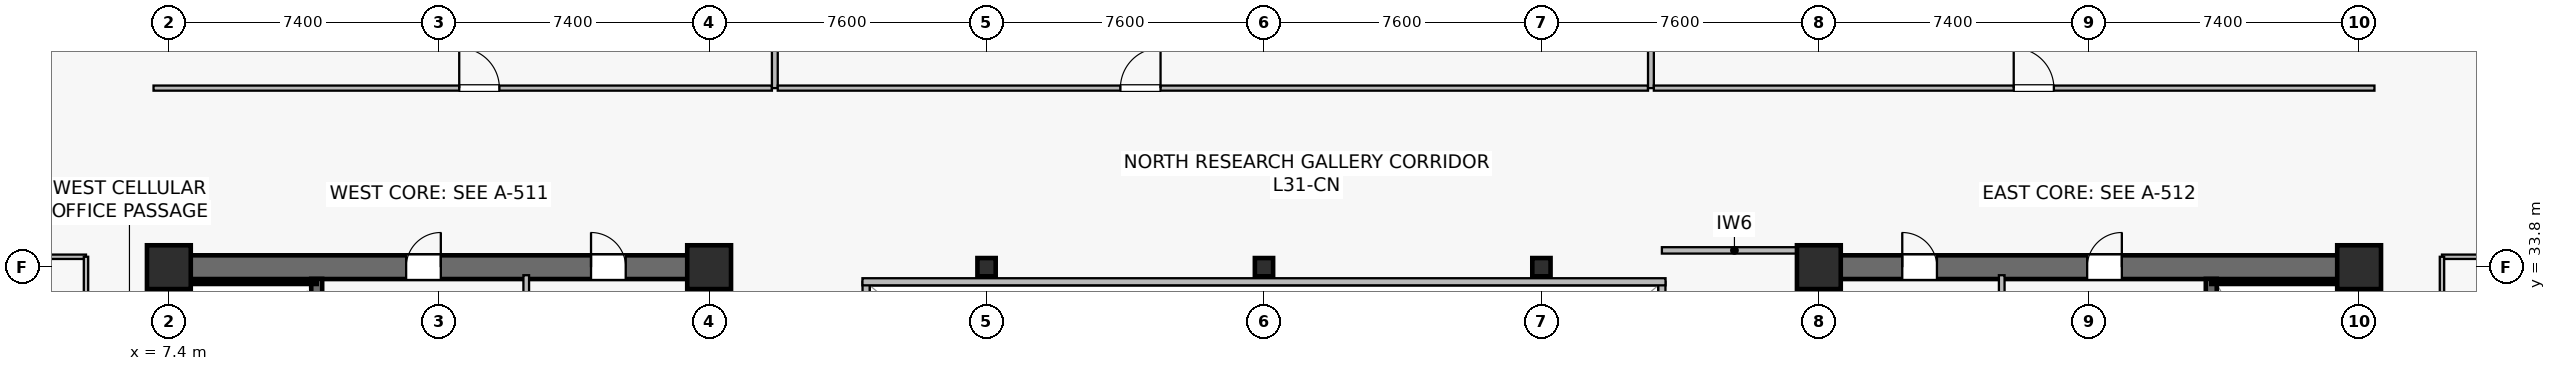
"""IFC4 building model, lengths in metres.
Left out: names, types, materials, properties, quantities, classifications, styles, units other than length and angle.
Written with IfcOpenShell. Run it as: python <this file> out.ifc"""

import sys

from ifc_helpers import new_model, si_unit, direction, frame, frame_2d, origin, origin_2d, place, context, subcontext, project, spatial, rectangle, hollow_rectangle, extrude, source, transform, mapped, element, fill, save


model = new_model("IFC4")
c1 = context("Model", 3, precision=1e-05, world=origin(), true_north=direction((0.0, 1.0)))
c2 = subcontext(c1, "Body", "Model", "MODEL_VIEW")
j1 = project(units=[si_unit("LENGTHUNIT", "METRE"), si_unit("PLANEANGLEUNIT", "RADIAN")], contexts=[c1])
p1 = place(None, origin())
s1 = spatial("IfcSite", under=j1, at=p1, CompositionType="ELEMENT")
p2 = place(p1, origin())
s2 = spatial("IfcBuilding", under=s1, at=p2, CompositionType="ELEMENT")
p3 = place(p2, frame((0.0, 0.0, 129.7)))
s3 = spatial("IfcBuildingStorey", under=s2, at=p3, CompositionType="ELEMENT", Elevation=129.7)
p4 = place(p3, frame((7.075, 33.8, 0.0), z_axis=(0.0, 0.0, 1.0), x_axis=(1.0, 0.0, 0.0)))
e1 = element("IfcWall", 1, at=p4, inside=s3, PredefinedType="SHEAR", context=c2, shape_type="SweptSolid", body=[
    extrude(rectangle(XDim=15.45, YDim=0.65, at=frame_2d((7.725, 0.0))), origin(), (0.0, 0.0, 1.0), 3.79),
])
p5 = place(p4, frame((6.825, 0.0, 0.0)))
e2 = element("IfcOpeningElement", 2, at=p5, cuts=e1, PredefinedType="OPENING", context=c2, shape_type="SweptSolid", body=[
    extrude(rectangle(XDim=0.95, YDim=2.15, at=frame_2d((0.475, 1.075))), frame((0.0, 0.335, 0.0), z_axis=(0.0, -1.0, 0.0), x_axis=(1.0, 0.0, 0.0)), (0.0, 0.0, 1.0), 0.67),
])
p6 = place(p4, frame((11.89, 0.0, 0.0)))
e3 = element("IfcOpeningElement", 3, at=p6, cuts=e1, PredefinedType="OPENING", context=c2, shape_type="SweptSolid", body=[
    extrude(rectangle(XDim=0.95, YDim=2.15, at=frame_2d((0.475, 1.075))), frame((0.0, 0.335, 0.0), z_axis=(0.0, -1.0, 0.0), x_axis=(1.0, 0.0, 0.0)), (0.0, 0.0, 1.0), 0.67),
])
p7 = place(p3, frame((7.4, 15.125, 0.0), z_axis=(0.0, 0.0, 1.0), x_axis=(0.0, 1.0, 0.0)))
e4 = element("IfcWall", 4, at=p7, inside=s3, PredefinedType="SHEAR", context=c2, shape_type="SweptSolid", body=[
    extrude(rectangle(XDim=18.35, YDim=0.65, at=frame_2d((9.175, 0.0))), origin(), (0.0, 0.0, 1.0), 3.79),
])
p8 = place(p3, frame((22.2, 15.125, 0.0), z_axis=(0.0, 0.0, 1.0), x_axis=(0.0, 1.0, 0.0)))
e5 = element("IfcWall", 5, at=p8, inside=s3, PredefinedType="SHEAR", context=c2, shape_type="SweptSolid", body=[
    extrude(rectangle(XDim=18.35, YDim=0.65, at=frame_2d((9.175, 0.0))), origin(), (0.0, 0.0, 1.0), 3.79),
])
p9 = place(p8, frame((3.425, 0.0, 0.0)))
e6 = element("IfcOpeningElement", 6, at=p9, cuts=e5, PredefinedType="OPENING", context=c2, shape_type="SweptSolid", body=[
    extrude(rectangle(XDim=1.42, YDim=2.2, at=frame_2d((0.71, 1.1))), frame((0.0, 0.335, 0.0), z_axis=(0.0, -1.0, 0.0), x_axis=(1.0, 0.0, 0.0)), (0.0, 0.0, 1.0), 0.67),
])
p10 = place(p3, frame((11.45, 24.85, 0.0), z_axis=(0.0, 0.0, 1.0), x_axis=(0.0, 1.0, 0.0)))
e7 = element("IfcWall", 7, at=p10, inside=s3, PredefinedType="SHEAR", context=c2, shape_type="SweptSolid", body=[
    extrude(rectangle(XDim=8.63, YDim=0.3, at=frame_2d((4.315, 0.0))), origin(), (0.0, 0.0, 1.0), 3.79),
])
p11 = place(p10, frame((0.42, 0.0, 0.0)))
e8 = element("IfcOpeningElement", 8, at=p11, cuts=e7, PredefinedType="OPENING", context=c2, shape_type="SweptSolid", body=[
    extrude(rectangle(XDim=1.1, YDim=2.15, at=frame_2d((0.55, 1.075))), frame((0.0, 0.16, 0.0), z_axis=(0.0, -1.0, 0.0), x_axis=(1.0, 0.0, 0.0)), (0.0, 0.0, 1.0), 0.32),
])
p12 = place(p3, frame((7.73, 33.4, 0.0), z_axis=(0.0, 0.0, 1.0), x_axis=(1.0, 0.0, 0.0)))
e9 = element("IfcWall", 9, at=p12, inside=s3, PredefinedType="SOLIDWALL", context=c2, shape_type="SweptSolid", body=[
    extrude(rectangle(XDim=3.72, YDim=0.12, at=frame_2d((1.86, 0.0))), origin(), (0.0, 0.0, 1.0), 3.79),
])
p13 = place(p3, frame((7.73, 25.0, 0.0), z_axis=(0.0, 0.0, 1.0), x_axis=(0.0, 1.0, 0.0)))
e10 = element("IfcWall", 10, at=p13, inside=s3, PredefinedType="SOLIDWALL", context=c2, shape_type="SweptSolid", body=[
    extrude(rectangle(XDim=8.32, YDim=0.12, at=frame_2d((4.16, 0.0))), origin(), (0.0, 0.0, 1.0), 3.79),
])
p14 = place(p3, frame((52.275, 33.8, 0.0), z_axis=(0.0, 0.0, 1.0), x_axis=(1.0, 0.0, 0.0)))
e11 = element("IfcWall", 11, at=p14, inside=s3, PredefinedType="SHEAR", context=c2, shape_type="SweptSolid", body=[
    extrude(rectangle(XDim=15.45, YDim=0.65, at=frame_2d((7.725, 0.0))), origin(), (0.0, 0.0, 1.0), 3.79),
])
p15 = place(p14, frame((7.675, 0.0, 0.0)))
e12 = element("IfcOpeningElement", 12, at=p15, cuts=e11, PredefinedType="OPENING", context=c2, shape_type="SweptSolid", body=[
    extrude(rectangle(XDim=0.95, YDim=2.15, at=frame_2d((0.475, 1.075))), frame((0.0, 0.335, 0.0), z_axis=(0.0, -1.0, 0.0), x_axis=(1.0, 0.0, 0.0)), (0.0, 0.0, 1.0), 0.67),
])
p16 = place(p14, frame((2.61, 0.0, 0.0)))
e13 = element("IfcOpeningElement", 13, at=p16, cuts=e11, PredefinedType="OPENING", context=c2, shape_type="SweptSolid", body=[
    extrude(rectangle(XDim=0.95, YDim=2.15, at=frame_2d((0.475, 1.075))), frame((0.0, 0.335, 0.0), z_axis=(0.0, -1.0, 0.0), x_axis=(1.0, 0.0, 0.0)), (0.0, 0.0, 1.0), 0.67),
])
p17 = place(p3, frame((52.6, 15.125, 0.0), z_axis=(0.0, 0.0, 1.0), x_axis=(0.0, 1.0, 0.0)))
e14 = element("IfcWall", 14, at=p17, inside=s3, PredefinedType="SHEAR", context=c2, shape_type="SweptSolid", body=[
    extrude(rectangle(XDim=18.35, YDim=0.65, at=frame_2d((9.175, 0.0))), origin(), (0.0, 0.0, 1.0), 3.79),
])
p18 = place(p17, frame((3.425, 0.0, 0.0)))
e15 = element("IfcOpeningElement", 15, at=p18, cuts=e14, PredefinedType="OPENING", context=c2, shape_type="SweptSolid", body=[
    extrude(rectangle(XDim=1.42, YDim=2.2, at=frame_2d((0.71, 1.1))), frame((0.0, 0.335, 0.0), z_axis=(0.0, -1.0, 0.0), x_axis=(1.0, 0.0, 0.0)), (0.0, 0.0, 1.0), 0.67),
])
p19 = place(p3, frame((67.4, 15.125, 0.0), z_axis=(0.0, 0.0, 1.0), x_axis=(0.0, 1.0, 0.0)))
e16 = element("IfcWall", 16, at=p19, inside=s3, PredefinedType="SHEAR", context=c2, shape_type="SweptSolid", body=[
    extrude(rectangle(XDim=18.35, YDim=0.65, at=frame_2d((9.175, 0.0))), origin(), (0.0, 0.0, 1.0), 3.79),
])
p20 = place(p3, frame((63.35, 24.85, 0.0), z_axis=(0.0, 0.0, 1.0), x_axis=(0.0, 1.0, 0.0)))
e17 = element("IfcWall", 17, at=p20, inside=s3, PredefinedType="SHEAR", context=c2, shape_type="SweptSolid", body=[
    extrude(rectangle(XDim=8.63, YDim=0.3, at=frame_2d((4.315, 0.0))), origin(), (0.0, 0.0, 1.0), 3.79),
])
p21 = place(p20, frame((0.42, 0.0, 0.0)))
e18 = element("IfcOpeningElement", 18, at=p21, cuts=e17, PredefinedType="OPENING", context=c2, shape_type="SweptSolid", body=[
    extrude(rectangle(XDim=1.1, YDim=2.15, at=frame_2d((0.55, 1.075))), frame((0.0, 0.16, 0.0), z_axis=(0.0, -1.0, 0.0), x_axis=(1.0, 0.0, 0.0)), (0.0, 0.0, 1.0), 0.32),
])
p22 = place(p3, frame((63.35, 33.4, 0.0), z_axis=(0.0, 0.0, 1.0), x_axis=(1.0, 0.0, 0.0)))
e19 = element("IfcWall", 19, at=p22, inside=s3, PredefinedType="SOLIDWALL", context=c2, shape_type="SweptSolid", body=[
    extrude(rectangle(XDim=3.72, YDim=0.12, at=frame_2d((1.86, 0.0))), origin(), (0.0, 0.0, 1.0), 3.79),
])
p23 = place(p3, frame((67.07, 25.0, 0.0), z_axis=(0.0, 0.0, 1.0), x_axis=(0.0, 1.0, 0.0)))
e20 = element("IfcWall", 20, at=p23, inside=s3, PredefinedType="SOLIDWALL", context=c2, shape_type="SweptSolid", body=[
    extrude(rectangle(XDim=8.32, YDim=0.12, at=frame_2d((4.16, 0.0))), origin(), (0.0, 0.0, 1.0), 3.79),
])
m1 = source(origin(), c2, "Body", "SweptSolid", [
    extrude(rectangle(XDim=1.2, YDim=1.2, at=origin_2d()), origin(), (0.0, 0.0, 1.0), 4.1),
])
for number, where, z_axis, x_axis in (
    (21, (7.4, 33.8, 0.0), (0.0, 0.0, 1.0), (1.0, 0.0, 0.0)),
    (22, (22.2, 33.8, 0.0), (0.0, 0.0, 1.0), (1.0, 0.0, 0.0)),
    (23, (52.6, 33.8, 0.0), (0.0, 0.0, 1.0), (1.0, 0.0, 0.0)),
    (24, (67.4, 33.8, 0.0), (0.0, 0.0, 1.0), (1.0, 0.0, 0.0)),
):
    element("IfcColumn", number, at=place(p3, frame(where, z_axis=z_axis, x_axis=x_axis)), inside=s3, PredefinedType="COLUMN", context=c2, shape_type="MappedRepresentation", body=[
        mapped(m1, transform((0.0, 0.0, 0.0), scale=1.0)),
    ])
m2 = source(origin(), c2, "Body", "SweptSolid", [
    extrude(hollow_rectangle(XDim=0.5, YDim=0.5, WallThickness=0.022, at=origin_2d()), origin(), (0.0, 0.0, 1.0), 4.1),
])
for number, where, z_axis, x_axis in (
    (25, (29.8, 33.8, 0.0), (0.0, 0.0, 1.0), (1.0, 0.0, 0.0)),
    (26, (37.4, 33.8, 0.0), (0.0, 0.0, 1.0), (1.0, 0.0, 0.0)),
    (27, (45.0, 33.8, 0.0), (0.0, 0.0, 1.0), (1.0, 0.0, 0.0)),
):
    element("IfcColumn", number, at=place(p3, frame(where, z_axis=z_axis, x_axis=x_axis)), inside=s3, PredefinedType="COLUMN", context=c2, shape_type="MappedRepresentation", body=[
        mapped(m2, transform((0.0, 0.0, 0.0), scale=1.0)),
    ])
for number, where, z_axis, x_axis in (
    (28, (17.19, 29.65, 0.0), (0.0, 0.0, 1.0), (0.0, 1.0, 0.0)),
    (29, (57.61, 29.65, 0.0), (0.0, 0.0, 1.0), (0.0, 1.0, 0.0)),
):
    element("IfcWall", number, at=place(p3, frame(where, z_axis=z_axis, x_axis=x_axis)), inside=s3, PredefinedType="PLUMBINGWALL", context=c2, shape_type="SweptSolid", body=[
        extrude(rectangle(XDim=3.93, YDim=0.155, at=frame_2d((1.965, 0.0))), origin(), (0.0, 0.0, 1.0), 3.79),
    ])
p24 = place(p3, frame((48.3, 34.26, 0.0), z_axis=(0.0, 0.0, 1.0), x_axis=(1.0, 0.0, 0.0)))
e30 = element("IfcWall", 30, at=p24, inside=s3, PredefinedType="PARTITIONING", context=c2, shape_type="SweptSolid", body=[
    extrude(rectangle(XDim=3.975, YDim=0.175, at=frame_2d((1.987, 0.0))), origin(), (0.0, 0.0, 1.0), 3.475),
])
p25 = place(p3, frame((26.5, 15.2, 0.0), z_axis=(0.0, 0.0, 1.0), x_axis=(0.0, 1.0, 0.0)))
e31 = element("IfcWall", 31, at=p25, inside=s3, PredefinedType="SOLIDWALL", context=c2, shape_type="SweptSolid", body=[
    extrude(rectangle(XDim=18.2, YDim=0.195, at=frame_2d((9.1, 0.0))), origin(), (0.0, 0.0, 1.0), 3.79),
])
p26 = place(p25, frame((1.8, 0.0, 0.9)))
e32 = element("IfcOpeningElement", 32, at=p26, cuts=e31, PredefinedType="OPENING", context=c2, shape_type="SweptSolid", body=[
    extrude(rectangle(XDim=1.2, YDim=1.35, at=frame_2d((0.6, 0.675))), frame((0.0, 0.107, 0.0), z_axis=(0.0, -1.0, 0.0), x_axis=(1.0, 0.0, 0.0)), (0.0, 0.0, 1.0), 0.215),
])
p27 = place(p25, frame((13.2, 0.0, 0.9)))
e33 = element("IfcOpeningElement", 33, at=p27, cuts=e31, PredefinedType="OPENING", context=c2, shape_type="SweptSolid", body=[
    extrude(rectangle(XDim=1.2, YDim=1.35, at=frame_2d((0.6, 0.675))), frame((0.0, 0.107, 0.0), z_axis=(0.0, -1.0, 0.0), x_axis=(1.0, 0.0, 0.0)), (0.0, 0.0, 1.0), 0.215),
])
p28 = place(p3, frame((48.3, 15.2, 0.0), z_axis=(0.0, 0.0, 1.0), x_axis=(0.0, 1.0, 0.0)))
e34 = element("IfcWall", 34, at=p28, inside=s3, PredefinedType="SOLIDWALL", context=c2, shape_type="SweptSolid", body=[
    extrude(rectangle(XDim=18.2, YDim=0.195, at=frame_2d((9.1, 0.0))), origin(), (0.0, 0.0, 1.0), 3.79),
])
p29 = place(p28, frame((1.8, 0.0, 0.9)))
e35 = element("IfcOpeningElement", 35, at=p29, cuts=e34, PredefinedType="OPENING", context=c2, shape_type="SweptSolid", body=[
    extrude(rectangle(XDim=1.2, YDim=1.35, at=frame_2d((0.6, 0.675))), frame((0.0, 0.107, 0.0), z_axis=(0.0, -1.0, 0.0), x_axis=(1.0, 0.0, 0.0)), (0.0, 0.0, 1.0), 0.215),
])
p30 = place(p28, frame((13.2, 0.0, 0.9)))
e36 = element("IfcOpeningElement", 36, at=p30, cuts=e34, PredefinedType="OPENING", context=c2, shape_type="SweptSolid", body=[
    extrude(rectangle(XDim=1.2, YDim=1.35, at=frame_2d((0.6, 0.675))), frame((0.0, 0.107, 0.0), z_axis=(0.0, -1.0, 0.0), x_axis=(1.0, 0.0, 0.0)), (0.0, 0.0, 1.0), 0.215),
])
p31 = place(p3, frame((26.4, 33.4, 0.0), z_axis=(0.0, 0.0, 1.0), x_axis=(1.0, 0.0, 0.0)))
e37 = element("IfcWall", 37, at=p31, inside=s3, PredefinedType="SOLIDWALL", context=c2, shape_type="SweptSolid", body=[
    extrude(rectangle(XDim=22.0, YDim=0.195, at=frame_2d((11.0, 0.0))), origin(), (0.0, 0.0, 1.0), 3.79),
])
p32 = place(p3, frame((6.98, 38.705, 0.0), z_axis=(0.0, 0.0, 1.0), x_axis=(1.0, 0.0, 0.0)))
e38 = element("IfcWall", 38, at=p32, inside=s3, PredefinedType="PARTITIONING", context=c2, shape_type="SweptSolid", body=[
    extrude(rectangle(XDim=16.94, YDim=0.14, at=frame_2d((8.47, 0.0))), origin(), (0.0, 0.0, 1.0), 3.125),
])
p33 = place(p32, frame((8.374, 0.0, 0.0)))
e39 = element("IfcOpeningElement", 39, at=p33, cuts=e38, PredefinedType="OPENING", context=c2, shape_type="SweptSolid", body=[
    extrude(rectangle(XDim=1.1, YDim=2.18, at=frame_2d((0.55, 1.09))), frame((0.0, 0.08, 0.0), z_axis=(0.0, -1.0, 0.0), x_axis=(1.0, 0.0, 0.0)), (0.0, 0.0, 1.0), 0.16),
])
p34 = place(p3, frame((24.0, 38.705, 0.0), z_axis=(0.0, 0.0, 1.0), x_axis=(0.0, 1.0, 0.0)))
e40 = element("IfcWall", 40, at=p34, inside=s3, PredefinedType="PARTITIONING", context=c2, shape_type="SweptSolid", body=[
    extrude(rectangle(XDim=8.485, YDim=0.16, at=frame_2d((4.242, 0.0))), origin(), (0.0, 0.0, 1.0), 3.075),
])
p35 = place(p3, frame((24.08, 38.705, 0.0), z_axis=(0.0, 0.0, 1.0), x_axis=(1.0, 0.0, 0.0)))
e41 = element("IfcWall", 41, at=p35, inside=s3, PredefinedType="PARTITIONING", context=c2, shape_type="SweptSolid", body=[
    extrude(rectangle(XDim=23.84, YDim=0.14, at=frame_2d((11.92, 0.0))), origin(), (0.0, 0.0, 1.0), 3.125),
])
p36 = place(p35, frame((9.386, 0.0, 0.0)))
e42 = element("IfcOpeningElement", 42, at=p36, cuts=e41, PredefinedType="OPENING", context=c2, shape_type="SweptSolid", body=[
    extrude(rectangle(XDim=1.1, YDim=2.18, at=frame_2d((0.55, 1.09))), frame((0.0, 0.08, 0.0), z_axis=(0.0, -1.0, 0.0), x_axis=(1.0, 0.0, 0.0)), (0.0, 0.0, 1.0), 0.16),
])
p37 = place(p3, frame((48.0, 38.705, 0.0), z_axis=(0.0, 0.0, 1.0), x_axis=(0.0, 1.0, 0.0)))
e43 = element("IfcWall", 43, at=p37, inside=s3, PredefinedType="PARTITIONING", context=c2, shape_type="SweptSolid", body=[
    extrude(rectangle(XDim=7.285, YDim=0.16, at=frame_2d((3.643, 0.0))), origin(), (0.0, 0.0, 1.0), 3.075),
])
p38 = place(p3, frame((48.08, 38.705, 0.0), z_axis=(0.0, 0.0, 1.0), x_axis=(1.0, 0.0, 0.0)))
e44 = element("IfcWall", 44, at=p38, inside=s3, PredefinedType="PARTITIONING", context=c2, shape_type="SweptSolid", body=[
    extrude(rectangle(XDim=19.74, YDim=0.14, at=frame_2d((9.87, 0.0))), origin(), (0.0, 0.0, 1.0), 3.125),
])
p39 = place(p38, frame((9.858, 0.0, 0.0)))
e45 = element("IfcOpeningElement", 45, at=p39, cuts=e44, PredefinedType="OPENING", context=c2, shape_type="SweptSolid", body=[
    extrude(rectangle(XDim=1.1, YDim=2.18, at=frame_2d((0.55, 1.09))), frame((0.0, 0.08, 0.0), z_axis=(0.0, -1.0, 0.0), x_axis=(1.0, 0.0, 0.0)), (0.0, 0.0, 1.0), 0.16),
])
p40 = place(p3, frame((2.11, 34.085, 0.0), z_axis=(0.0, 0.0, 1.0), x_axis=(1.0, 0.0, 0.0)))
e46 = element("IfcWall", 46, at=p40, inside=s3, PredefinedType="PARTITIONING", context=c2, shape_type="SweptSolid", body=[
    extrude(rectangle(XDim=3.02, YDim=0.12, at=frame_2d((1.51, 0.0))), origin(), (0.0, 0.0, 1.0), 3.79),
])
p41 = place(p3, frame((5.13, 22.06, 0.0), z_axis=(0.0, 0.0, 1.0), x_axis=(0.0, 1.0, 0.0)))
e47 = element("IfcWall", 47, at=p41, inside=s3, PredefinedType="PARTITIONING", context=c2, shape_type="SweptSolid", body=[
    extrude(rectangle(XDim=12.025, YDim=0.12, at=frame_2d((6.012, 0.0))), origin(), (0.0, 0.0, 1.0), 3.79),
])
p42 = place(p41, frame((5.562, 0.0, 0.0)))
e48 = element("IfcOpeningElement", 48, at=p42, cuts=e47, PredefinedType="OPENING", context=c2, shape_type="SweptSolid", body=[
    extrude(rectangle(XDim=0.9, YDim=2.1, at=frame_2d((0.45, 1.05))), frame((0.0, 0.07, 0.0), z_axis=(0.0, -1.0, 0.0), x_axis=(1.0, 0.0, 0.0)), (0.0, 0.0, 1.0), 0.14),
])
p43 = place(p3, frame((69.67, 34.085, 0.0), z_axis=(0.0, 0.0, 1.0), x_axis=(1.0, 0.0, 0.0)))
e49 = element("IfcWall", 49, at=p43, inside=s3, PredefinedType="PARTITIONING", context=c2, shape_type="SweptSolid", body=[
    extrude(rectangle(XDim=3.02, YDim=0.12, at=frame_2d((1.51, 0.0))), origin(), (0.0, 0.0, 1.0), 3.79),
])
p44 = place(p3, frame((69.67, 14.515, 0.0), z_axis=(0.0, 0.0, 1.0), x_axis=(0.0, 1.0, 0.0)))
e50 = element("IfcWall", 50, at=p44, inside=s3, PredefinedType="PARTITIONING", context=c2, shape_type="SweptSolid", body=[
    extrude(rectangle(XDim=19.57, YDim=0.12, at=frame_2d((9.785, 0.0))), origin(), (0.0, 0.0, 1.0), 3.79),
])
p45 = place(p44, frame((9.335, 0.0, 0.0)))
e51 = element("IfcOpeningElement", 51, at=p45, cuts=e50, PredefinedType="OPENING", context=c2, shape_type="SweptSolid", body=[
    extrude(rectangle(XDim=0.9, YDim=2.1, at=frame_2d((0.45, 1.05))), frame((0.0, 0.07, 0.0), z_axis=(0.0, -1.0, 0.0), x_axis=(1.0, 0.0, 0.0)), (0.0, 0.0, 1.0), 0.14),
])
m3 = source(origin(), c2, "Body", "SweptSolid", [
    extrude(rectangle(XDim=0.95, YDim=2.15, at=frame_2d((0.475, 1.075))), frame((0.0, 0.025, 0.0), z_axis=(0.0, -1.0, 0.0), x_axis=(1.0, 0.0, 0.0)), (0.0, 0.0, 1.0), 0.05),
])
p46 = place(p5, origin())
e52 = element("IfcDoor", 52, at=p46, inside=s3, OperationType="SINGLE_SWING_RIGHT", PredefinedType="DOOR", context=c2, shape_type="MappedRepresentation", body=[
    mapped(m3, transform((0.0, 0.0, 0.0), scale=1.0)),
])
fill(e2, e52)
p47 = place(p6, origin())
e53 = element("IfcDoor", 53, at=p47, inside=s3, OperationType="SINGLE_SWING_LEFT", PredefinedType="DOOR", context=c2, shape_type="MappedRepresentation", body=[
    mapped(m3, transform((0.0, 0.0, 0.0), scale=1.0)),
])
fill(e3, e53)
p48 = place(p15, origin())
e54 = element("IfcDoor", 54, at=p48, inside=s3, OperationType="SINGLE_SWING_RIGHT", PredefinedType="DOOR", context=c2, shape_type="MappedRepresentation", body=[
    mapped(m3, transform((0.0, 0.0, 0.0), scale=1.0)),
])
fill(e12, e54)
p49 = place(p16, origin())
e55 = element("IfcDoor", 55, at=p49, inside=s3, OperationType="SINGLE_SWING_LEFT", PredefinedType="DOOR", context=c2, shape_type="MappedRepresentation", body=[
    mapped(m3, transform((0.0, 0.0, 0.0), scale=1.0)),
])
fill(e13, e55)
m4 = source(origin(), c2, "Body", "SweptSolid", [
    extrude(rectangle(XDim=1.1, YDim=2.18, at=frame_2d((0.55, 1.09))), frame((0.0, 0.025, 0.0), z_axis=(0.0, -1.0, 0.0), x_axis=(1.0, 0.0, 0.0)), (0.0, 0.0, 1.0), 0.05),
])
p50 = place(p33, origin())
e56 = element("IfcDoor", 56, at=p50, inside=s3, OperationType="SINGLE_SWING_LEFT", PredefinedType="DOOR", context=c2, shape_type="MappedRepresentation", body=[
    mapped(m4, transform((0.0, 0.0, 0.0), scale=1.0)),
])
fill(e39, e56)
p51 = place(p36, origin())
e57 = element("IfcDoor", 57, at=p51, inside=s3, OperationType="SINGLE_SWING_RIGHT", PredefinedType="DOOR", context=c2, shape_type="MappedRepresentation", body=[
    mapped(m4, transform((0.0, 0.0, 0.0), scale=1.0)),
])
fill(e42, e57)
p52 = place(p39, origin())
e58 = element("IfcDoor", 58, at=p52, inside=s3, OperationType="SINGLE_SWING_LEFT", PredefinedType="DOOR", context=c2, shape_type="MappedRepresentation", body=[
    mapped(m4, transform((0.0, 0.0, 0.0), scale=1.0)),
])
fill(e45, e58)
save(model, sys.argv[1])
